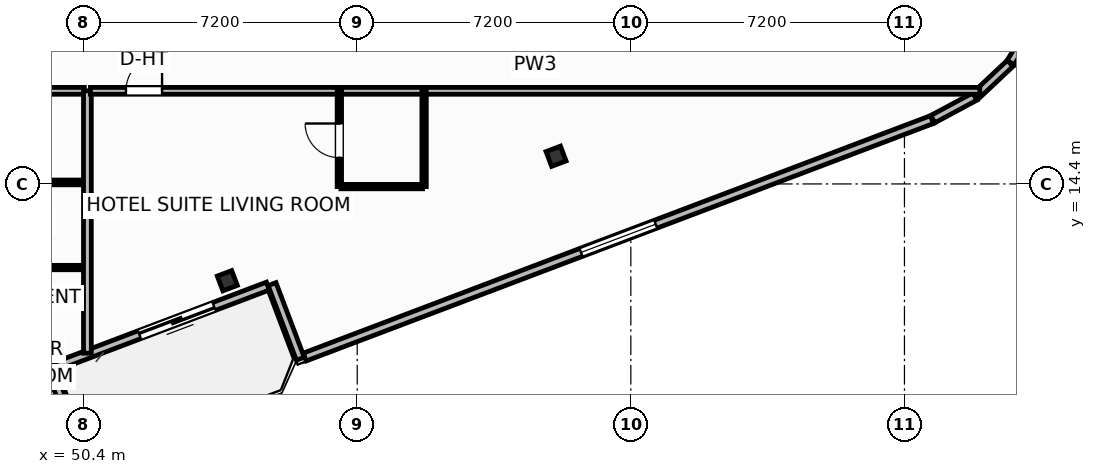
"""IFC4 building model, lengths in metres.
Left out: names, types, materials, properties, quantities, classifications, styles, units other than length and angle.
Written with IfcOpenShell. Run it as: python <this file> out.ifc"""

import sys

from ifc_helpers import new_model, si_unit, direction, frame, frame_2d, origin, origin_2d, place, context, subcontext, project, spatial, rectangle, i_section, extrude, element, fill, save


model = new_model("IFC4")
c1 = context("Model", 3, precision=1e-05, world=origin(), true_north=direction((0.0, 1.0)))
c2 = subcontext(c1, "Body", "Model", "MODEL_VIEW")
j1 = project(units=[si_unit("LENGTHUNIT", "METRE"), si_unit("PLANEANGLEUNIT", "RADIAN")], contexts=[c1])
p1 = place(None, origin())
s1 = spatial("IfcSite", under=j1, at=p1, CompositionType="ELEMENT")
p2 = place(p1, origin())
s2 = spatial("IfcBuilding", under=s1, at=p2, CompositionType="ELEMENT")
p3 = place(p2, frame((0.0, 0.0, 220.1)))
s3 = spatial("IfcBuildingStorey", under=s2, at=p3, CompositionType="ELEMENT", Elevation=220.1)
for number, where, z_axis, x_axis in (
    (1, (54.181, 11.853, 0.0), (0.0, 0.0, 1.0), (0.935, 0.354, 0.0)),
    (2, (62.832, 15.128, 0.0), (0.0, 0.0, 1.0), (0.935, 0.354, 0.0)),
):
    element("IfcColumn", number, at=place(p3, frame(where, z_axis=z_axis, x_axis=x_axis)), inside=s3, PredefinedType="COLUMN", context=c2, shape_type="SweptSolid", body=[
        extrude(i_section(OverallWidth=0.406, OverallDepth=0.416, WebThickness=0.03, FlangeThickness=0.048, FilletRadius=0.025, at=origin_2d()), origin(), (0.0, 0.0, 1.0), 3.7),
    ])
p4 = place(p3, frame((55.25, 11.713, 0.0), z_axis=(0.0, 0.0, 1.0), x_axis=(-0.935227640088, -0.354046976001, 0.0)))
e3 = element("IfcWall", 3, at=p4, inside=s3, PredefinedType="SOLIDWALL", context=c2, shape_type="SweptSolid", body=[
    extrude(rectangle(XDim=6.0, YDim=0.22, at=frame_2d((3.0, 0.0))), origin(), (0.0, 0.0, 1.0), 2.73),
])
p5 = place(p4, frame((1.516, 0.0, 0.0)))
e4 = element("IfcOpeningElement", 4, at=p5, cuts=e3, PredefinedType="OPENING", context=c2, shape_type="SweptSolid", body=[
    extrude(rectangle(XDim=2.1, YDim=2.3, at=frame_2d((1.05, 1.15))), frame((0.0, 0.12, 0.0), z_axis=(0.0, -1.0, 0.0), x_axis=(1.0, 0.0, 0.0)), (0.0, 0.0, 1.0), 0.24),
])
p6 = place(p3, frame((50.223, 7.708, 0.0), z_axis=(0.0, 0.0, 1.0), x_axis=(-0.354020680661, 0.935237594232, 0.0)))
e5 = element("IfcWall", 5, at=p6, inside=s3, PredefinedType="SOLIDWALL", context=c2, shape_type="SweptSolid", body=[
    extrude(rectangle(XDim=1.975, YDim=0.22, at=frame_2d((0.988, 0.0))), origin(), (0.0, 0.0, 1.0), 2.73),
])
p7 = place(p3, frame((55.359, 11.764, 0.0), z_axis=(0.0, 0.0, 1.0), x_axis=(0.354026782794, -0.935235284334, 0.0)))
e6 = element("IfcWall", 6, at=p7, inside=s3, PredefinedType="SOLIDWALL", context=c2, shape_type="SweptSolid", body=[
    extrude(rectangle(XDim=2.1, YDim=0.22, at=frame_2d((1.05, 0.0))), origin(), (0.0, 0.0, 1.0), 2.73),
])
p8 = place(p3, frame((56.219, 9.845, 0.0), z_axis=(0.0, 0.0, 1.0), x_axis=(0.935225601791, 0.354052360188, 0.0)))
e7 = element("IfcWall", 7, at=p8, inside=s3, PredefinedType="SOLIDWALL", context=c2, shape_type="SweptSolid", body=[
    extrude(rectangle(XDim=17.647, YDim=0.22, at=frame_2d((8.824, 0.0))), origin(), (0.0, 0.0, 1.0), 2.73),
])
p9 = place(p8, frame((7.774, 0.0, 0.8)))
e8 = element("IfcOpeningElement", 8, at=p9, cuts=e7, PredefinedType="OPENING", context=c2, shape_type="SweptSolid", body=[
    extrude(rectangle(XDim=2.1, YDim=1.75, at=frame_2d((1.05, 0.875))), frame((0.0, 0.12, 0.0), z_axis=(0.0, -1.0, 0.0), x_axis=(1.0, 0.0, 0.0)), (0.0, 0.0, 1.0), 0.24),
])
p10 = place(p3, frame((72.746, 16.105, 0.0), z_axis=(0.0, 0.0, 1.0), x_axis=(0.881112879796, 0.472906008693, 0.0)))
e9 = element("IfcWall", 9, at=p10, inside=s3, PredefinedType="SOLIDWALL", context=c2, shape_type="SweptSolid", body=[
    extrude(rectangle(XDim=1.257, YDim=0.22, at=frame_2d((0.628, 0.0))), origin(), (0.0, 0.0, 1.0), 2.73),
])
p11 = place(p3, frame((73.871, 16.717, 0.0), z_axis=(0.0, 0.0, 1.0), x_axis=(0.728475443486, 0.685071914647, 0.0)))
e10 = element("IfcWall", 10, at=p11, inside=s3, PredefinedType="SOLIDWALL", context=c2, shape_type="SweptSolid", body=[
    extrude(rectangle(XDim=1.249, YDim=0.22, at=frame_2d((0.625, 0.0))), origin(), (0.0, 0.0, 1.0), 2.73),
])
p12 = place(p3, frame((74.794, 17.593, 0.0), z_axis=(0.0, 0.0, 1.0), x_axis=(0.526549805576, 0.850144283194, 0.0)))
e11 = element("IfcWall", 11, at=p12, inside=s3, PredefinedType="SOLIDWALL", context=c2, shape_type="SweptSolid", body=[
    extrude(rectangle(XDim=1.249, YDim=0.22, at=frame_2d((0.624, 0.0))), origin(), (0.0, 0.0, 1.0), 2.73),
])
p13 = place(p3, frame((40.58, 16.85, 0.0), z_axis=(0.0, 0.0, 1.0), x_axis=(1.0, 0.0, 0.0)))
e12 = element("IfcWall", 12, at=p13, inside=s3, PredefinedType="PARTITIONING", context=c2, shape_type="SweptSolid", body=[
    extrude(rectangle(XDim=9.84, YDim=0.18, at=frame_2d((4.92, 0.0))), origin(), (0.0, 0.0, 1.0), 3.45),
])
p14 = place(p13, frame((2.302, 0.0, 0.0)))
e13 = element("IfcOpeningElement", 13, at=p14, cuts=e12, PredefinedType="OPENING", context=c2, shape_type="SweptSolid", body=[
    extrude(rectangle(XDim=1.0, YDim=2.2, at=frame_2d((0.5, 1.1))), frame((0.0, 0.1, 0.0), z_axis=(0.0, -1.0, 0.0), x_axis=(1.0, 0.0, 0.0)), (0.0, 0.0, 1.0), 0.2),
])
p15 = place(p3, frame((46.325, 14.44, 0.0), z_axis=(0.0, 0.0, 1.0), x_axis=(1.0, 0.0, 0.0)))
e14 = element("IfcWall", 14, at=p15, inside=s3, PredefinedType="PARTITIONING", context=c2, shape_type="SweptSolid", body=[
    extrude(rectangle(XDim=4.095, YDim=0.125, at=frame_2d((2.047, 0.0))), origin(), (0.0, 0.0, 1.0), 3.45),
])
p16 = place(p3, frame((46.325, 12.2, 0.0), z_axis=(0.0, 0.0, 1.0), x_axis=(1.0, 0.0, 0.0)))
e15 = element("IfcWall", 15, at=p16, inside=s3, PredefinedType="PARTITIONING", context=c2, shape_type="SweptSolid", body=[
    extrude(rectangle(XDim=4.095, YDim=0.115, at=frame_2d((2.047, 0.0))), origin(), (0.0, 0.0, 1.0), 3.45),
])
p17 = place(p3, frame((50.5, 9.946, 0.0), z_axis=(0.0, 0.0, 1.0), x_axis=(0.0, 1.0, 0.0)))
e16 = element("IfcWall", 16, at=p17, inside=s3, PredefinedType="PARTITIONING", context=c2, shape_type="SweptSolid", body=[
    extrude(rectangle(XDim=6.904, YDim=0.205, at=frame_2d((3.452, 0.0))), origin(), (0.0, 0.0, 1.0), 3.45),
])
p18 = place(p3, frame((50.58, 16.85, 0.0), z_axis=(0.0, 0.0, 1.0), x_axis=(1.0, 0.0, 0.0)))
e17 = element("IfcWall", 17, at=p18, inside=s3, PredefinedType="PARTITIONING", context=c2, shape_type="SweptSolid", body=[
    extrude(rectangle(XDim=23.404, YDim=0.18, at=frame_2d((11.702, 0.0))), origin(), (0.0, 0.0, 1.0), 3.45),
])
p19 = place(p18, frame((0.935, 0.0, 0.0)))
e18 = element("IfcOpeningElement", 18, at=p19, cuts=e17, PredefinedType="OPENING", context=c2, shape_type="SweptSolid", body=[
    extrude(rectangle(XDim=0.95, YDim=2.15, at=frame_2d((0.475, 1.075))), frame((0.0, 0.1, 0.0), z_axis=(0.0, -1.0, 0.0), x_axis=(1.0, 0.0, 0.0)), (0.0, 0.0, 1.0), 0.2),
])
p20 = place(p3, frame((57.17, 14.33, 0.0), z_axis=(0.0, 0.0, 1.0), x_axis=(1.0, 0.0, 0.0)))
e19 = element("IfcWall", 19, at=p20, inside=s3, PredefinedType="PARTITIONING", context=c2, shape_type="SweptSolid", body=[
    extrude(rectangle(XDim=2.15, YDim=0.115, at=frame_2d((1.075, 0.0))), origin(), (0.0, 0.0, 1.0), 3.45),
])
p21 = place(p3, frame((57.13, 14.33, 0.0), z_axis=(0.0, 0.0, 1.0), x_axis=(0.0, 1.0, 0.0)))
e20 = element("IfcWall", 20, at=p21, inside=s3, PredefinedType="PARTITIONING", context=c2, shape_type="SweptSolid", body=[
    extrude(rectangle(XDim=2.52, YDim=0.115, at=frame_2d((1.26, 0.0))), origin(), (0.0, 0.0, 1.0), 3.45),
])
p22 = place(p21, frame((0.76, 0.0, 0.0)))
e21 = element("IfcOpeningElement", 21, at=p22, cuts=e20, PredefinedType="OPENING", context=c2, shape_type="SweptSolid", body=[
    extrude(rectangle(XDim=0.9, YDim=2.05, at=frame_2d((0.45, 1.025))), frame((0.0, 0.067, 0.0), z_axis=(0.0, -1.0, 0.0), x_axis=(1.0, 0.0, 0.0)), (0.0, 0.0, 1.0), 0.135),
])
p23 = place(p3, frame((59.36, 14.33, 0.0), z_axis=(0.0, 0.0, 1.0), x_axis=(0.0, 1.0, 0.0)))
e22 = element("IfcWall", 22, at=p23, inside=s3, PredefinedType="PARTITIONING", context=c2, shape_type="SweptSolid", body=[
    extrude(rectangle(XDim=2.52, YDim=0.115, at=frame_2d((1.26, 0.0))), origin(), (0.0, 0.0, 1.0), 3.45),
])
p24 = place(p5, origin())
e23 = element("IfcDoor", 23, at=p24, inside=s3, OperationType="SLIDING_TO_LEFT", PredefinedType="DOOR", context=c2, shape_type="SweptSolid", body=[
    extrude(rectangle(XDim=2.1, YDim=2.3, at=frame_2d((1.05, 1.15))), frame((0.0, 0.025, 0.0), z_axis=(0.0, -1.0, 0.0), x_axis=(1.0, 0.0, 0.0)), (0.0, 0.0, 1.0), 0.05),
])
fill(e4, e23)
p25 = place(p9, origin())
e24 = element("IfcWindow", 24, at=p25, inside=s3, PartitioningType="SINGLE_PANEL", PredefinedType="WINDOW", context=c2, shape_type="SweptSolid", body=[
    extrude(rectangle(XDim=2.1, YDim=1.75, at=frame_2d((1.05, 0.875))), frame((0.0, 0.03, 0.0), z_axis=(0.0, -1.0, 0.0), x_axis=(1.0, 0.0, 0.0)), (0.0, 0.0, 1.0), 0.06),
])
fill(e8, e24)
p26 = place(p19, origin())
e25 = element("IfcDoor", 25, at=p26, inside=s3, OperationType="SINGLE_SWING_RIGHT", PredefinedType="DOOR", context=c2, shape_type="SweptSolid", body=[
    extrude(rectangle(XDim=0.95, YDim=2.15, at=frame_2d((0.475, 1.075))), frame((0.0, 0.025, 0.0), z_axis=(0.0, -1.0, 0.0), x_axis=(1.0, 0.0, 0.0)), (0.0, 0.0, 1.0), 0.05),
])
fill(e18, e25)
p27 = place(p22, origin())
e26 = element("IfcDoor", 26, at=p27, inside=s3, OperationType="SINGLE_SWING_RIGHT", PredefinedType="DOOR", context=c2, shape_type="SweptSolid", body=[
    extrude(rectangle(XDim=0.9, YDim=2.05, at=frame_2d((0.45, 1.025))), frame((0.0, 0.025, 0.0), z_axis=(0.0, -1.0, 0.0), x_axis=(1.0, 0.0, 0.0)), (0.0, 0.0, 1.0), 0.05),
])
fill(e21, e26)
save(model, sys.argv[1])
